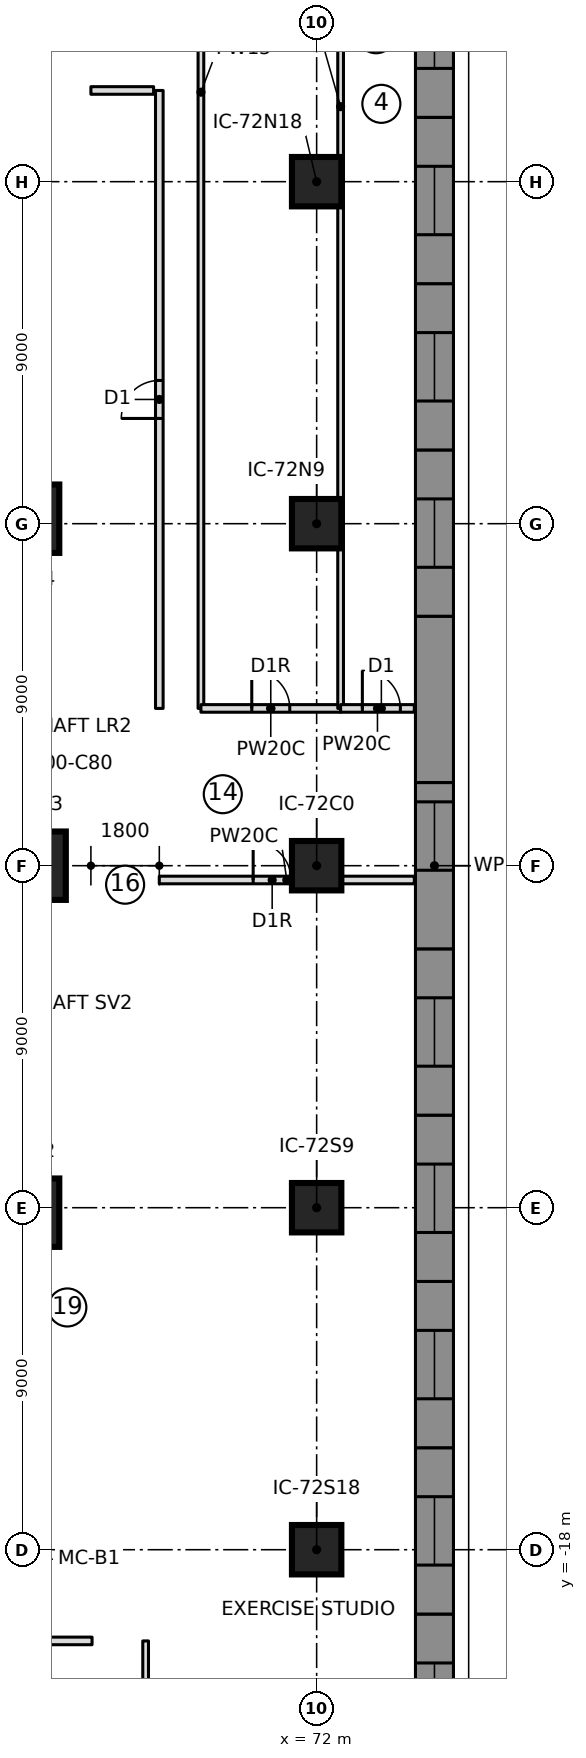
"""IFC4 building model, lengths in metres.
Left out: names, types, materials, properties, quantities, classifications, styles, units other than length and angle.
Written with IfcOpenShell. Run it as: python <this file> out.ifc"""

import sys

from ifc_helpers import new_model, si_unit, direction, frame, frame_2d, origin, origin_2d, place, context, subcontext, project, spatial, polyline, rectangle, outline, extrude, element, fill, save


model = new_model("IFC4")
c1 = context("Model", 3, precision=1e-05, world=origin(), true_north=direction((0.0, 1.0)))
c2 = subcontext(c1, "Body", "Model", "MODEL_VIEW")
j1 = project(units=[si_unit("LENGTHUNIT", "METRE"), si_unit("PLANEANGLEUNIT", "RADIAN")], contexts=[c1])
p1 = place(None, origin())
s1 = spatial("IfcSite", under=j1, at=p1, CompositionType="ELEMENT")
p2 = place(p1, origin())
s2 = spatial("IfcBuilding", under=s1, at=p2, CompositionType="ELEMENT")
p3 = place(p2, frame((0.0, 0.0, 19.0)))
s3 = spatial("IfcBuildingStorey", under=s2, at=p3, CompositionType="ELEMENT", Elevation=19.0)
for number, where, z_axis, x_axis in (
    (1, (64.328, -9.131, 0.0), (0.0, 0.0, 1.0), (1.0, 0.0, 0.0)),
    (2, (64.5, 0.0, 0.0), (0.0, 0.0, 1.0), (1.0, 0.0, 0.0)),
    (3, (64.328, 9.131, 0.0), (0.0, 0.0, 1.0), (1.0, 0.0, 0.0)),
):
    element("IfcColumn", number, at=place(p3, frame(where, z_axis=z_axis, x_axis=x_axis)), inside=s3, PredefinedType="COLUMN", context=c2, shape_type="SweptSolid", body=[
        extrude(rectangle(XDim=1.8, YDim=1.8, at=origin_2d()), origin(), (0.0, 0.0, 1.0), 5.0),
    ])
for number, where, z_axis, x_axis in (
    (4, (72.0, -18.0, 0.0), (0.0, 0.0, 1.0), (1.0, 0.0, 0.0)),
    (5, (72.0, -9.0, 0.0), (0.0, 0.0, 1.0), (1.0, 0.0, 0.0)),
    (6, (72.0, 0.0, 0.0), (0.0, 0.0, 1.0), (1.0, 0.0, 0.0)),
    (7, (72.0, 9.0, 0.0), (0.0, 0.0, 1.0), (1.0, 0.0, 0.0)),
    (8, (72.0, 18.0, 0.0), (0.0, 0.0, 1.0), (1.0, 0.0, 0.0)),
):
    element("IfcColumn", number, at=place(p3, frame(where, z_axis=z_axis, x_axis=x_axis)), inside=s3, PredefinedType="COLUMN", context=c2, shape_type="SweptSolid", body=[
        extrude(rectangle(XDim=1.3, YDim=1.3, at=origin_2d()), origin(), (0.0, 0.0, 1.0), 5.0),
    ])
p4 = place(p3, frame((75.1, -24.069, 0.0), z_axis=(0.0, 0.0, 1.0), x_axis=(0.0, 1.0, 0.0)))
e9 = element("IfcWall", 9, at=p4, inside=s3, PredefinedType="NOTDEFINED", context=c2, shape_type="SweptSolid", body=[
    extrude(outline(polyline([(0.0, -0.5), (4.376, -0.5), (4.376, 0.5), (0.0, 0.5), (0.0, -0.5)])), origin(), (0.0, 0.0, 1.0), 4.7),
])
p5 = place(p4, frame((1.288, 0.0, 0.9)))
e10 = element("IfcOpeningElement", 10, at=p5, cuts=e9, PredefinedType="OPENING", context=c2, shape_type="SweptSolid", body=[
    extrude(rectangle(XDim=1.8, YDim=2.4, at=frame_2d((0.9, 1.2))), frame((0.0, 0.51, 0.0), z_axis=(0.0, -1.0, 0.0), x_axis=(1.0, 0.0, 0.0)), (0.0, 0.0, 1.0), 1.02),
])
p6 = place(p3, frame((75.1, -19.693, 0.0), z_axis=(0.0, 0.0, 1.0), x_axis=(0.0, 1.0, 0.0)))
e11 = element("IfcWall", 11, at=p6, inside=s3, PredefinedType="NOTDEFINED", context=c2, shape_type="SweptSolid", body=[
    extrude(outline(polyline([(0.0, -0.5), (4.376, -0.5), (4.376, 0.5), (0.0, 0.5), (0.0, -0.5)])), origin(), (0.0, 0.0, 1.0), 4.7),
])
p7 = place(p6, frame((1.288, 0.0, 0.9)))
e12 = element("IfcOpeningElement", 12, at=p7, cuts=e11, PredefinedType="OPENING", context=c2, shape_type="SweptSolid", body=[
    extrude(rectangle(XDim=1.8, YDim=2.4, at=frame_2d((0.9, 1.2))), frame((0.0, 0.51, 0.0), z_axis=(0.0, -1.0, 0.0), x_axis=(1.0, 0.0, 0.0)), (0.0, 0.0, 1.0), 1.02),
])
p8 = place(p3, frame((75.1, -15.316, 0.0), z_axis=(0.0, 0.0, 1.0), x_axis=(0.0, 1.0, 0.0)))
e13 = element("IfcWall", 13, at=p8, inside=s3, PredefinedType="NOTDEFINED", context=c2, shape_type="SweptSolid", body=[
    extrude(outline(polyline([(0.0, -0.5), (4.376, -0.5), (4.376, 0.5), (0.0, 0.5), (0.0, -0.5)])), origin(), (0.0, 0.0, 1.0), 4.7),
])
p9 = place(p8, frame((1.288, 0.0, 0.9)))
e14 = element("IfcOpeningElement", 14, at=p9, cuts=e13, PredefinedType="OPENING", context=c2, shape_type="SweptSolid", body=[
    extrude(rectangle(XDim=1.8, YDim=2.4, at=frame_2d((0.9, 1.2))), frame((0.0, 0.51, 0.0), z_axis=(0.0, -1.0, 0.0), x_axis=(1.0, 0.0, 0.0)), (0.0, 0.0, 1.0), 1.02),
])
p10 = place(p3, frame((75.1, -10.94, 0.0), z_axis=(0.0, 0.0, 1.0), x_axis=(0.0, 1.0, 0.0)))
e15 = element("IfcWall", 15, at=p10, inside=s3, PredefinedType="NOTDEFINED", context=c2, shape_type="SweptSolid", body=[
    extrude(outline(polyline([(0.0, -0.5), (4.376, -0.5), (4.376, 0.5), (0.0, 0.5), (0.0, -0.5)])), origin(), (0.0, 0.0, 1.0), 4.7),
])
p11 = place(p10, frame((1.288, 0.0, 0.9)))
e16 = element("IfcOpeningElement", 16, at=p11, cuts=e15, PredefinedType="OPENING", context=c2, shape_type="SweptSolid", body=[
    extrude(rectangle(XDim=1.8, YDim=2.4, at=frame_2d((0.9, 1.2))), frame((0.0, 0.51, 0.0), z_axis=(0.0, -1.0, 0.0), x_axis=(1.0, 0.0, 0.0)), (0.0, 0.0, 1.0), 1.02),
])
p12 = place(p3, frame((75.1, -6.564, 0.0), z_axis=(0.0, 0.0, 1.0), x_axis=(0.0, 1.0, 0.0)))
e17 = element("IfcWall", 17, at=p12, inside=s3, PredefinedType="NOTDEFINED", context=c2, shape_type="SweptSolid", body=[
    extrude(outline(polyline([(0.0, -0.5), (4.376, -0.5), (4.376, 0.5), (0.0, 0.5), (0.0, -0.5)])), origin(), (0.0, 0.0, 1.0), 4.7),
])
p13 = place(p12, frame((1.288, 0.0, 0.9)))
e18 = element("IfcOpeningElement", 18, at=p13, cuts=e17, PredefinedType="OPENING", context=c2, shape_type="SweptSolid", body=[
    extrude(rectangle(XDim=1.8, YDim=2.4, at=frame_2d((0.9, 1.2))), frame((0.0, 0.51, 0.0), z_axis=(0.0, -1.0, 0.0), x_axis=(1.0, 0.0, 0.0)), (0.0, 0.0, 1.0), 1.02),
])
p14 = place(p3, frame((75.1, -2.188, 0.0), z_axis=(0.0, 0.0, 1.0), x_axis=(0.0, 1.0, 0.0)))
e19 = element("IfcWall", 19, at=p14, inside=s3, PredefinedType="NOTDEFINED", context=c2, shape_type="SweptSolid", body=[
    extrude(outline(polyline([(0.0, -0.5), (4.376, -0.5), (4.376, 0.5), (0.0, 0.5), (0.0, -0.5)])), origin(), (0.0, 0.0, 1.0), 4.7),
])
p15 = place(p14, frame((2.068, 0.0, 0.9)))
e20 = element("IfcOpeningElement", 20, at=p15, cuts=e19, PredefinedType="OPENING", context=c2, shape_type="SweptSolid", body=[
    extrude(rectangle(XDim=1.8, YDim=2.4, at=frame_2d((0.9, 1.2))), frame((0.0, 0.51, 0.0), z_axis=(0.0, -1.0, 0.0), x_axis=(1.0, 0.0, 0.0)), (0.0, 0.0, 1.0), 1.02),
])
p16 = place(p3, frame((75.1, 2.188, 0.0), z_axis=(0.0, 0.0, 1.0), x_axis=(0.0, 1.0, 0.0)))
e21 = element("IfcWall", 21, at=p16, inside=s3, PredefinedType="NOTDEFINED", context=c2, shape_type="SweptSolid", body=[
    extrude(outline(polyline([(0.0, -0.5), (4.376, -0.5), (4.376, 0.5), (0.0, 0.5), (0.0, -0.5)])), origin(), (0.0, 0.0, 1.0), 4.7),
])
p17 = place(p3, frame((75.1, 6.564, 0.0), z_axis=(0.0, 0.0, 1.0), x_axis=(0.0, 1.0, 0.0)))
e22 = element("IfcWall", 22, at=p17, inside=s3, PredefinedType="NOTDEFINED", context=c2, shape_type="SweptSolid", body=[
    extrude(outline(polyline([(0.0, -0.5), (4.376, -0.5), (4.376, 0.5), (0.0, 0.5), (0.0, -0.5)])), origin(), (0.0, 0.0, 1.0), 4.7),
])
p18 = place(p17, frame((1.288, 0.0, 0.9)))
e23 = element("IfcOpeningElement", 23, at=p18, cuts=e22, PredefinedType="OPENING", context=c2, shape_type="SweptSolid", body=[
    extrude(rectangle(XDim=1.8, YDim=2.4, at=frame_2d((0.9, 1.2))), frame((0.0, 0.51, 0.0), z_axis=(0.0, -1.0, 0.0), x_axis=(1.0, 0.0, 0.0)), (0.0, 0.0, 1.0), 1.02),
])
p19 = place(p3, frame((75.1, 10.94, 0.0), z_axis=(0.0, 0.0, 1.0), x_axis=(0.0, 1.0, 0.0)))
e24 = element("IfcWall", 24, at=p19, inside=s3, PredefinedType="NOTDEFINED", context=c2, shape_type="SweptSolid", body=[
    extrude(outline(polyline([(0.0, -0.5), (4.376, -0.5), (4.376, 0.5), (0.0, 0.5), (0.0, -0.5)])), origin(), (0.0, 0.0, 1.0), 4.7),
])
p20 = place(p19, frame((1.288, 0.0, 0.9)))
e25 = element("IfcOpeningElement", 25, at=p20, cuts=e24, PredefinedType="OPENING", context=c2, shape_type="SweptSolid", body=[
    extrude(rectangle(XDim=1.8, YDim=2.4, at=frame_2d((0.9, 1.2))), frame((0.0, 0.51, 0.0), z_axis=(0.0, -1.0, 0.0), x_axis=(1.0, 0.0, 0.0)), (0.0, 0.0, 1.0), 1.02),
])
p21 = place(p3, frame((75.1, 15.316, 0.0), z_axis=(0.0, 0.0, 1.0), x_axis=(0.0, 1.0, 0.0)))
e26 = element("IfcWall", 26, at=p21, inside=s3, PredefinedType="NOTDEFINED", context=c2, shape_type="SweptSolid", body=[
    extrude(outline(polyline([(0.0, -0.5), (4.376, -0.5), (4.376, 0.5), (0.0, 0.5), (0.0, -0.5)])), origin(), (0.0, 0.0, 1.0), 4.7),
])
p22 = place(p21, frame((1.288, 0.0, 0.9)))
e27 = element("IfcOpeningElement", 27, at=p22, cuts=e26, PredefinedType="OPENING", context=c2, shape_type="SweptSolid", body=[
    extrude(rectangle(XDim=1.8, YDim=2.4, at=frame_2d((0.9, 1.2))), frame((0.0, 0.51, 0.0), z_axis=(0.0, -1.0, 0.0), x_axis=(1.0, 0.0, 0.0)), (0.0, 0.0, 1.0), 1.02),
])
p23 = place(p3, frame((75.1, 19.693, 0.0), z_axis=(0.0, 0.0, 1.0), x_axis=(0.0, 1.0, 0.0)))
e28 = element("IfcWall", 28, at=p23, inside=s3, PredefinedType="NOTDEFINED", context=c2, shape_type="SweptSolid", body=[
    extrude(outline(polyline([(0.0, -0.5), (4.376, -0.5), (4.376, 0.5), (0.0, 0.5), (0.0, -0.5)])), origin(), (0.0, 0.0, 1.0), 4.7),
])
p24 = place(p23, frame((1.288, 0.0, 0.9)))
e29 = element("IfcOpeningElement", 29, at=p24, cuts=e28, PredefinedType="OPENING", context=c2, shape_type="SweptSolid", body=[
    extrude(rectangle(XDim=1.8, YDim=2.4, at=frame_2d((0.9, 1.2))), frame((0.0, 0.51, 0.0), z_axis=(0.0, -1.0, 0.0), x_axis=(1.0, 0.0, 0.0)), (0.0, 0.0, 1.0), 1.02),
])
p25 = place(p3, frame((67.5, -36.6, 0.0), z_axis=(0.0, 0.0, 1.0), x_axis=(0.0, 1.0, 0.0)))
e30 = element("IfcWall", 30, at=p25, inside=s3, PredefinedType="PARTITIONING", context=c2, shape_type="SweptSolid", body=[
    extrude(rectangle(XDim=16.2, YDim=0.15, at=frame_2d((8.1, 0.0))), origin(), (0.0, 0.0, 1.0), 4.65),
])
p26 = place(p3, frame((67.859, -0.376, 0.0), z_axis=(0.0, 0.0, 1.0), x_axis=(1.0, 0.0, 0.0)))
e31 = element("IfcWall", 31, at=p26, inside=s3, PredefinedType="PARTITIONING", context=c2, shape_type="SweptSolid", body=[
    extrude(rectangle(XDim=6.711, YDim=0.2, at=frame_2d((3.355, 0.0))), origin(), (0.0, 0.0, 1.0), 4.65),
])
p27 = place(p26, frame((2.47, 0.0, 0.0)))
e32 = element("IfcOpeningElement", 32, at=p27, cuts=e31, PredefinedType="OPENING", context=c2, shape_type="SweptSolid", body=[
    extrude(rectangle(XDim=1.0, YDim=2.1, at=frame_2d((0.5, 1.05))), frame((0.0, 0.11, 0.0), z_axis=(0.0, -1.0, 0.0), x_axis=(1.0, 0.0, 0.0)), (0.0, 0.0, 1.0), 0.22),
])
p28 = place(p3, frame((68.955, 4.139, 0.0), z_axis=(0.0, 0.0, 1.0), x_axis=(0.0, 1.0, 0.0)))
e33 = element("IfcWall", 33, at=p28, inside=s3, PredefinedType="PARTITIONING", context=c2, shape_type="SweptSolid", body=[
    extrude(rectangle(XDim=32.431, YDim=0.15, at=frame_2d((16.216, 0.0))), origin(), (0.0, 0.0, 1.0), 4.65),
])
p29 = place(p3, frame((68.955, 4.139, 0.0), z_axis=(0.0, 0.0, 1.0), x_axis=(1.0, 0.0, 0.0)))
e34 = element("IfcWall", 34, at=p29, inside=s3, PredefinedType="PARTITIONING", context=c2, shape_type="SweptSolid", body=[
    extrude(rectangle(XDim=3.676, YDim=0.2, at=frame_2d((1.838, 0.0))), origin(), (0.0, 0.0, 1.0), 4.65),
])
p30 = place(p29, frame((1.338, 0.0, 0.0)))
e35 = element("IfcOpeningElement", 35, at=p30, cuts=e34, PredefinedType="OPENING", context=c2, shape_type="SweptSolid", body=[
    extrude(rectangle(XDim=1.0, YDim=2.1, at=frame_2d((0.5, 1.05))), frame((0.0, 0.11, 0.0), z_axis=(0.0, -1.0, 0.0), x_axis=(1.0, 0.0, 0.0)), (0.0, 0.0, 1.0), 0.22),
])
p31 = place(p3, frame((72.631, 4.139, 0.0), z_axis=(0.0, 0.0, 1.0), x_axis=(0.0, 1.0, 0.0)))
e36 = element("IfcWall", 36, at=p31, inside=s3, PredefinedType="PARTITIONING", context=c2, shape_type="SweptSolid", body=[
    extrude(rectangle(XDim=31.67, YDim=0.15, at=frame_2d((15.835, 0.0))), origin(), (0.0, 0.0, 1.0), 4.65),
])
p32 = place(p3, frame((72.631, 4.139, 0.0), z_axis=(0.0, 0.0, 1.0), x_axis=(1.0, 0.0, 0.0)))
e37 = element("IfcWall", 37, at=p32, inside=s3, PredefinedType="PARTITIONING", context=c2, shape_type="SweptSolid", body=[
    extrude(rectangle(XDim=1.939, YDim=0.2, at=frame_2d((0.97, 0.0))), origin(), (0.0, 0.0, 1.0), 4.65),
])
p33 = place(p32, frame((0.572, 0.0, 0.0)))
e38 = element("IfcOpeningElement", 38, at=p33, cuts=e37, PredefinedType="OPENING", context=c2, shape_type="SweptSolid", body=[
    extrude(rectangle(XDim=1.0, YDim=2.1, at=frame_2d((0.5, 1.05))), frame((0.0, 0.11, 0.0), z_axis=(0.0, -1.0, 0.0), x_axis=(1.0, 0.0, 0.0)), (0.0, 0.0, 1.0), 0.22),
])
p34 = place(p3, frame((57.3, -20.4, 0.0), z_axis=(0.0, 0.0, 1.0), x_axis=(1.0, 0.0, 0.0)))
e39 = element("IfcWall", 39, at=p34, inside=s3, PredefinedType="PARTITIONING", context=c2, shape_type="SweptSolid", body=[
    extrude(rectangle(XDim=8.79, YDim=0.2, at=frame_2d((4.395, 0.0))), origin(), (0.0, 0.0, 1.0), 4.65),
])
p35 = place(p34, frame((3.895, 0.0, 0.0)))
e40 = element("IfcOpeningElement", 40, at=p35, cuts=e39, PredefinedType="OPENING", context=c2, shape_type="SweptSolid", body=[
    extrude(rectangle(XDim=1.0, YDim=2.1, at=frame_2d((0.5, 1.05))), frame((0.0, 0.11, 0.0), z_axis=(0.0, -1.0, 0.0), x_axis=(1.0, 0.0, 0.0)), (0.0, 0.0, 1.0), 0.22),
])
p36 = place(p3, frame((67.86, 4.139, 0.0), z_axis=(0.0, 0.0, 1.0), x_axis=(0.0, 1.0, 0.0)))
e41 = element("IfcWall", 41, at=p36, inside=s3, PredefinedType="PARTITIONING", context=c2, shape_type="SweptSolid", body=[
    extrude(rectangle(XDim=16.261, YDim=0.2, at=frame_2d((8.131, 0.0))), origin(), (0.0, 0.0, 1.0), 4.65),
])
p37 = place(p36, frame((7.631, 0.0, 0.0)))
e42 = element("IfcOpeningElement", 42, at=p37, cuts=e41, PredefinedType="OPENING", context=c2, shape_type="SweptSolid", body=[
    extrude(rectangle(XDim=1.0, YDim=2.1, at=frame_2d((0.5, 1.05))), frame((0.0, 0.11, 0.0), z_axis=(0.0, -1.0, 0.0), x_axis=(1.0, 0.0, 0.0)), (0.0, 0.0, 1.0), 0.22),
])
p38 = place(p3, frame((66.06, 20.4, 0.0), z_axis=(0.0, 0.0, 1.0), x_axis=(1.0, 0.0, 0.0)))
e43 = element("IfcWall", 43, at=p38, inside=s3, PredefinedType="PARTITIONING", context=c2, shape_type="SweptSolid", body=[
    extrude(rectangle(XDim=1.65, YDim=0.2, at=frame_2d((0.825, 0.0))), origin(), (0.0, 0.0, 1.0), 4.65),
])
p39 = place(p5, origin())
e44 = element("IfcWindow", 44, at=p39, inside=s3, PartitioningType="SINGLE_PANEL", PredefinedType="WINDOW", context=c2, shape_type="SweptSolid", body=[
    extrude(rectangle(XDim=1.8, YDim=2.4, at=frame_2d((0.9, 1.2))), frame((0.0, 0.5, 0.0), z_axis=(0.0, -1.0, 0.0), x_axis=(1.0, 0.0, 0.0)), (0.0, 0.0, 1.0), 0.06),
])
fill(e10, e44)
p40 = place(p7, origin())
e45 = element("IfcWindow", 45, at=p40, inside=s3, PartitioningType="SINGLE_PANEL", PredefinedType="WINDOW", context=c2, shape_type="SweptSolid", body=[
    extrude(rectangle(XDim=1.8, YDim=2.4, at=frame_2d((0.9, 1.2))), frame((0.0, 0.5, 0.0), z_axis=(0.0, -1.0, 0.0), x_axis=(1.0, 0.0, 0.0)), (0.0, 0.0, 1.0), 0.06),
])
fill(e12, e45)
p41 = place(p9, origin())
e46 = element("IfcWindow", 46, at=p41, inside=s3, PartitioningType="SINGLE_PANEL", PredefinedType="WINDOW", context=c2, shape_type="SweptSolid", body=[
    extrude(rectangle(XDim=1.8, YDim=2.4, at=frame_2d((0.9, 1.2))), frame((0.0, 0.5, 0.0), z_axis=(0.0, -1.0, 0.0), x_axis=(1.0, 0.0, 0.0)), (0.0, 0.0, 1.0), 0.06),
])
fill(e14, e46)
p42 = place(p11, origin())
e47 = element("IfcWindow", 47, at=p42, inside=s3, PartitioningType="SINGLE_PANEL", PredefinedType="WINDOW", context=c2, shape_type="SweptSolid", body=[
    extrude(rectangle(XDim=1.8, YDim=2.4, at=frame_2d((0.9, 1.2))), frame((0.0, 0.5, 0.0), z_axis=(0.0, -1.0, 0.0), x_axis=(1.0, 0.0, 0.0)), (0.0, 0.0, 1.0), 0.06),
])
fill(e16, e47)
p43 = place(p13, origin())
e48 = element("IfcWindow", 48, at=p43, inside=s3, PartitioningType="SINGLE_PANEL", PredefinedType="WINDOW", context=c2, shape_type="SweptSolid", body=[
    extrude(rectangle(XDim=1.8, YDim=2.4, at=frame_2d((0.9, 1.2))), frame((0.0, 0.5, 0.0), z_axis=(0.0, -1.0, 0.0), x_axis=(1.0, 0.0, 0.0)), (0.0, 0.0, 1.0), 0.06),
])
fill(e18, e48)
p44 = place(p15, origin())
e49 = element("IfcWindow", 49, at=p44, inside=s3, PartitioningType="SINGLE_PANEL", PredefinedType="WINDOW", context=c2, shape_type="SweptSolid", body=[
    extrude(rectangle(XDim=1.8, YDim=2.4, at=frame_2d((0.9, 1.2))), frame((0.0, 0.5, 0.0), z_axis=(0.0, -1.0, 0.0), x_axis=(1.0, 0.0, 0.0)), (0.0, 0.0, 1.0), 0.06),
])
fill(e20, e49)
p45 = place(p18, origin())
e50 = element("IfcWindow", 50, at=p45, inside=s3, PartitioningType="SINGLE_PANEL", PredefinedType="WINDOW", context=c2, shape_type="SweptSolid", body=[
    extrude(rectangle(XDim=1.8, YDim=2.4, at=frame_2d((0.9, 1.2))), frame((0.0, 0.5, 0.0), z_axis=(0.0, -1.0, 0.0), x_axis=(1.0, 0.0, 0.0)), (0.0, 0.0, 1.0), 0.06),
])
fill(e23, e50)
p46 = place(p20, origin())
e51 = element("IfcWindow", 51, at=p46, inside=s3, PartitioningType="SINGLE_PANEL", PredefinedType="WINDOW", context=c2, shape_type="SweptSolid", body=[
    extrude(rectangle(XDim=1.8, YDim=2.4, at=frame_2d((0.9, 1.2))), frame((0.0, 0.5, 0.0), z_axis=(0.0, -1.0, 0.0), x_axis=(1.0, 0.0, 0.0)), (0.0, 0.0, 1.0), 0.06),
])
fill(e25, e51)
p47 = place(p22, origin())
e52 = element("IfcWindow", 52, at=p47, inside=s3, PartitioningType="SINGLE_PANEL", PredefinedType="WINDOW", context=c2, shape_type="SweptSolid", body=[
    extrude(rectangle(XDim=1.8, YDim=2.4, at=frame_2d((0.9, 1.2))), frame((0.0, 0.5, 0.0), z_axis=(0.0, -1.0, 0.0), x_axis=(1.0, 0.0, 0.0)), (0.0, 0.0, 1.0), 0.06),
])
fill(e27, e52)
p48 = place(p24, origin())
e53 = element("IfcWindow", 53, at=p48, inside=s3, PartitioningType="SINGLE_PANEL", PredefinedType="WINDOW", context=c2, shape_type="SweptSolid", body=[
    extrude(rectangle(XDim=1.8, YDim=2.4, at=frame_2d((0.9, 1.2))), frame((0.0, 0.5, 0.0), z_axis=(0.0, -1.0, 0.0), x_axis=(1.0, 0.0, 0.0)), (0.0, 0.0, 1.0), 0.06),
])
fill(e29, e53)
p49 = place(p27, origin())
e54 = element("IfcDoor", 54, at=p49, inside=s3, OperationType="SINGLE_SWING_RIGHT", PredefinedType="DOOR", context=c2, shape_type="SweptSolid", body=[
    extrude(rectangle(XDim=1.0, YDim=2.1, at=frame_2d((0.5, 1.05))), frame((0.0, 0.025, 0.0), z_axis=(0.0, -1.0, 0.0), x_axis=(1.0, 0.0, 0.0)), (0.0, 0.0, 1.0), 0.05),
])
fill(e32, e54)
p50 = place(p30, origin())
e55 = element("IfcDoor", 55, at=p50, inside=s3, OperationType="SINGLE_SWING_RIGHT", PredefinedType="DOOR", context=c2, shape_type="SweptSolid", body=[
    extrude(rectangle(XDim=1.0, YDim=2.1, at=frame_2d((0.5, 1.05))), frame((0.0, 0.025, 0.0), z_axis=(0.0, -1.0, 0.0), x_axis=(1.0, 0.0, 0.0)), (0.0, 0.0, 1.0), 0.05),
])
fill(e35, e55)
p51 = place(p33, origin())
e56 = element("IfcDoor", 56, at=p51, inside=s3, OperationType="SINGLE_SWING_LEFT", PredefinedType="DOOR", context=c2, shape_type="SweptSolid", body=[
    extrude(rectangle(XDim=1.0, YDim=2.1, at=frame_2d((0.5, 1.05))), frame((0.0, 0.025, 0.0), z_axis=(0.0, -1.0, 0.0), x_axis=(1.0, 0.0, 0.0)), (0.0, 0.0, 1.0), 0.05),
])
fill(e38, e56)
p52 = place(p37, origin())
e57 = element("IfcDoor", 57, at=p52, inside=s3, OperationType="SINGLE_SWING_LEFT", PredefinedType="DOOR", context=c2, shape_type="SweptSolid", body=[
    extrude(rectangle(XDim=1.0, YDim=2.1, at=frame_2d((0.5, 1.05))), frame((0.0, 0.025, 0.0), z_axis=(0.0, -1.0, 0.0), x_axis=(1.0, 0.0, 0.0)), (0.0, 0.0, 1.0), 0.05),
])
fill(e42, e57)
save(model, sys.argv[1])
